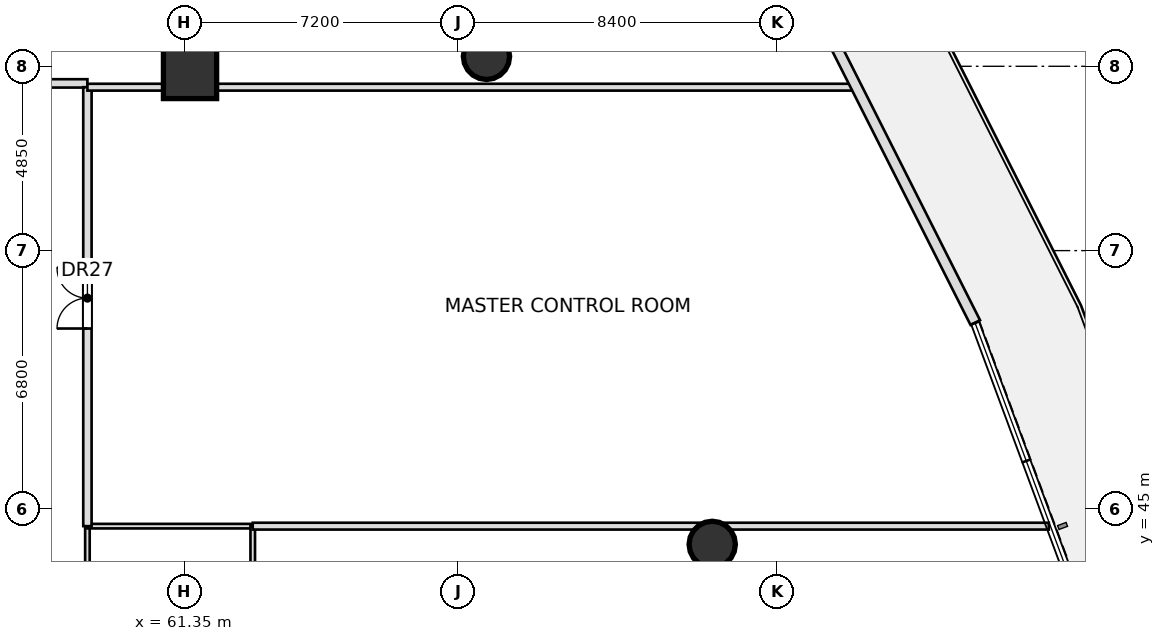
"""IFC4 building model, lengths in metres.
Left out: names, types, materials, properties, quantities, classifications, styles, units other than length and angle.
Written with IfcOpenShell. Run it as: python <this file> out.ifc"""

import sys

from ifc_helpers import new_model, si_unit, direction, frame, frame_2d, origin, origin_2d, place, context, subcontext, project, spatial, rectangle, hollow_circle, extrude, element, fill, save


model = new_model("IFC4")
c1 = context("Model", 3, precision=1e-05, world=origin(), true_north=direction((0.0, 1.0)))
c2 = subcontext(c1, "Body", "Model", "MODEL_VIEW")
j1 = project(units=[si_unit("LENGTHUNIT", "METRE"), si_unit("PLANEANGLEUNIT", "RADIAN")], contexts=[c1])
p1 = place(None, origin())
s1 = spatial("IfcSite", under=j1, at=p1, CompositionType="ELEMENT")
p2 = place(p1, origin())
s2 = spatial("IfcBuilding", under=s1, at=p2, CompositionType="ELEMENT")
p3 = place(p2, frame((0.0, 0.0, 5.8)))
s3 = spatial("IfcBuildingStorey", under=s2, at=p3, CompositionType="ELEMENT", Elevation=5.8)
p4 = place(p3, frame((61.5, 56.5, 0.0), z_axis=(0.0, 0.0, 1.0), x_axis=(1.0, 0.0, 0.0)))
e1 = element("IfcColumn", 1, at=p4, inside=s3, PredefinedType="COLUMN", context=c2, shape_type="SweptSolid", body=[
    extrude(rectangle(XDim=1.4, YDim=1.4, at=origin_2d()), origin(), (0.0, 0.0, 1.0), 5.25),
])
for number, where, z_axis, x_axis in (
    (2, (75.241, 44.07, 0.0), (0.0, 0.0, 1.0), (1.0, 0.0, 0.0)),
    (3, (69.301, 56.911, 0.0), (0.0, 0.0, 1.0), (1.0, 0.0, 0.0)),
):
    element("IfcColumn", number, at=place(p3, frame(where, z_axis=z_axis, x_axis=x_axis)), inside=s3, PredefinedType="COLUMN", context=c2, shape_type="SweptSolid", body=[
        extrude(hollow_circle(Radius=0.61, WallThickness=0.05, at=origin_2d()), origin(), (0.0, 0.0, 1.0), 5.25),
    ])
p5 = place(p3, frame((36.2, 56.2, 0.0), z_axis=(0.0, 0.0, 1.0), x_axis=(1.0, 0.0, 0.0)))
e4 = element("IfcWall", 4, at=p5, inside=s3, PredefinedType="PARTITIONING", context=c2, shape_type="SweptSolid", body=[
    extrude(rectangle(XDim=22.6, YDim=0.22, at=frame_2d((11.3, 0.0))), origin(), (0.0, 0.0, 1.0), 5.25),
])
p6 = place(p5, frame((6.5, 0.0, 0.0)))
e5 = element("IfcOpeningElement", 5, at=p6, cuts=e4, PredefinedType="OPENING", context=c2, shape_type="SweptSolid", body=[
    extrude(rectangle(XDim=1.6, YDim=2.3, at=frame_2d((0.8, 1.15))), frame((0.0, 0.12, 0.0), z_axis=(0.0, -1.0, 0.0), x_axis=(1.0, 0.0, 0.0)), (0.0, 0.0, 1.0), 0.24),
])
p7 = place(p3, frame((58.8, 38.25, 0.0), z_axis=(0.0, 0.0, 1.0), x_axis=(0.0, 1.0, 0.0)))
e6 = element("IfcWall", 6, at=p7, inside=s3, PredefinedType="PARTITIONING", context=c2, shape_type="SweptSolid", body=[
    extrude(rectangle(XDim=6.3, YDim=0.12, at=frame_2d((3.15, 0.0))), origin(), (0.0, 0.0, 1.0), 5.25),
])
p8 = place(p7, frame((0.8, 0.0, 0.0)))
e7 = element("IfcOpeningElement", 7, at=p8, cuts=e6, PredefinedType="OPENING", context=c2, shape_type="SweptSolid", body=[
    extrude(rectangle(XDim=0.9, YDim=2.05, at=frame_2d((0.45, 1.025))), frame((0.0, 0.07, 0.0), z_axis=(0.0, -1.0, 0.0), x_axis=(1.0, 0.0, 0.0)), (0.0, 0.0, 1.0), 0.14),
])
p9 = place(p7, frame((3.85, 0.0, 0.0)))
e8 = element("IfcOpeningElement", 8, at=p9, cuts=e6, PredefinedType="OPENING", context=c2, shape_type="SweptSolid", body=[
    extrude(rectangle(XDim=0.9, YDim=2.05, at=frame_2d((0.45, 1.025))), frame((0.0, 0.07, 0.0), z_axis=(0.0, -1.0, 0.0), x_axis=(1.0, 0.0, 0.0)), (0.0, 0.0, 1.0), 0.14),
])
p10 = place(p3, frame((58.8, 44.55, 0.0), z_axis=(0.0, 0.0, 1.0), x_axis=(1.0, 0.0, 0.0)))
e9 = element("IfcWall", 9, at=p10, inside=s3, PredefinedType="PARTITIONING", context=c2, shape_type="SweptSolid", body=[
    extrude(rectangle(XDim=4.35, YDim=0.12, at=frame_2d((2.175, 0.0))), origin(), (0.0, 0.0, 1.0), 5.25),
])
p11 = place(p3, frame((63.15, 38.25, 0.0), z_axis=(0.0, 0.0, 1.0), x_axis=(0.0, 1.0, 0.0)))
e10 = element("IfcWall", 10, at=p11, inside=s3, PredefinedType="PARTITIONING", context=c2, shape_type="SweptSolid", body=[
    extrude(rectangle(XDim=6.3, YDim=0.12, at=frame_2d((3.15, 0.0))), origin(), (0.0, 0.0, 1.0), 5.25),
])
p12 = place(p3, frame((58.8, 44.55, 0.0), z_axis=(0.0, 0.0, 1.0), x_axis=(0.0, 1.0, 0.0)))
e11 = element("IfcWall", 11, at=p12, inside=s3, PredefinedType="PARTITIONING", context=c2, shape_type="SweptSolid", body=[
    extrude(rectangle(XDim=11.55, YDim=0.22, at=frame_2d((5.775, 0.0))), origin(), (0.0, 0.0, 1.0), 4.325),
])
p13 = place(p12, frame((5.2, 0.0, 0.0)))
e12 = element("IfcOpeningElement", 12, at=p13, cuts=e11, PredefinedType="OPENING", context=c2, shape_type="SweptSolid", body=[
    extrude(rectangle(XDim=1.6, YDim=2.3, at=frame_2d((0.8, 1.15))), frame((0.0, 0.12, 0.0), z_axis=(0.0, -1.0, 0.0), x_axis=(1.0, 0.0, 0.0)), (0.0, 0.0, 1.0), 0.24),
])
p14 = place(p3, frame((58.8, 56.1, 0.0), z_axis=(0.0, 0.0, 1.0), x_axis=(1.0, 0.0, 0.0)))
e13 = element("IfcWall", 13, at=p14, inside=s3, PredefinedType="PARTITIONING", context=c2, shape_type="SweptSolid", body=[
    extrude(rectangle(XDim=20.192, YDim=0.18, at=frame_2d((10.096, 0.0))), origin(), (0.0, 0.0, 1.0), 4.425),
])
p15 = place(p3, frame((63.15, 44.55, 0.0), z_axis=(0.0, 0.0, 1.0), x_axis=(1.0, 0.0, 0.0)))
e14 = element("IfcWall", 14, at=p15, inside=s3, PredefinedType="PARTITIONING", context=c2, shape_type="SweptSolid", body=[
    extrude(rectangle(XDim=20.949, YDim=0.18, at=frame_2d((10.474, 0.0))), origin(), (0.0, 0.0, 1.0), 5.25),
])
p16 = place(p3, frame((82.164, 49.906, 0.0), z_axis=(0.0, 0.0, 1.0), x_axis=(-0.45063368748, 0.892708955768, 0.0)))
e15 = element("IfcWall", 15, at=p16, inside=s3, PredefinedType="STANDARD", context=c2, shape_type="SweptSolid", body=[
    extrude(rectangle(XDim=11.867, YDim=0.28, at=frame_2d((5.934, 0.0))), origin(), (0.0, 0.0, 1.0), 5.25),
])
p17 = place(p13, origin())
e16 = element("IfcDoor", 16, at=p17, inside=s3, OperationType="DOUBLE_DOOR_SINGLE_SWING", PredefinedType="DOOR", context=c2, shape_type="SweptSolid", body=[
    extrude(rectangle(XDim=1.6, YDim=2.3, at=frame_2d((0.8, 1.15))), frame((0.0, 0.025, 0.0), z_axis=(0.0, -1.0, 0.0), x_axis=(1.0, 0.0, 0.0)), (0.0, 0.0, 1.0), 0.05),
])
fill(e12, e16)
save(model, sys.argv[1])
